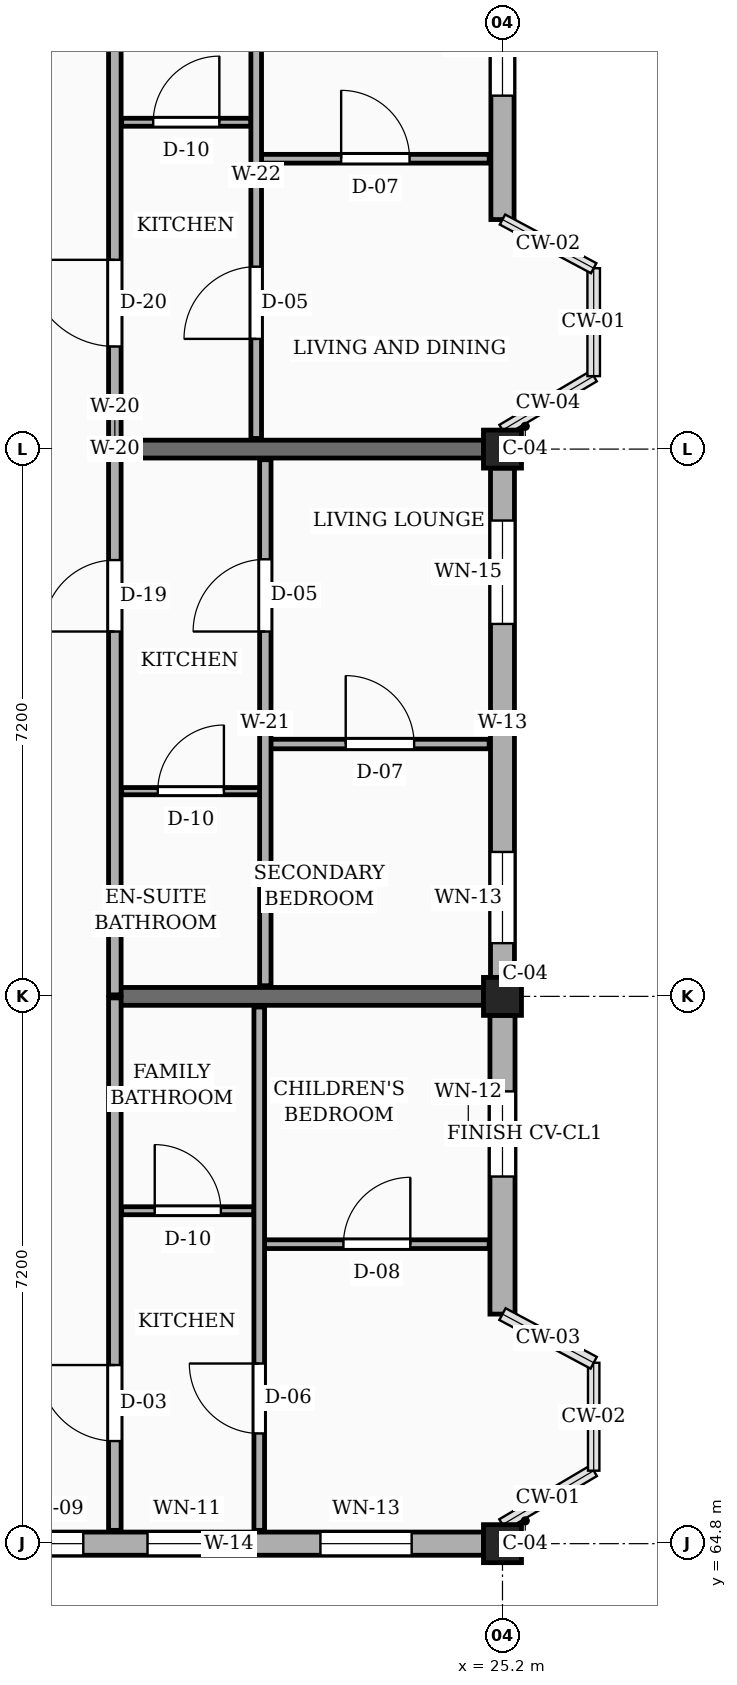
"""IFC4 building model, lengths in metres.
Left out: names, types, materials, properties, quantities, classifications, styles, units other than length and angle.
Written with IfcOpenShell. Run it as: python <this file> out.ifc"""

import sys

from ifc_helpers import new_model, si_unit, direction, frame, frame_2d, origin, origin_2d, place, context, subcontext, project, spatial, rectangle, extrude, element, fill, save


model = new_model("IFC4")
c1 = context("Model", 3, precision=1e-05, world=origin(), true_north=direction((0.0, 1.0)))
c2 = subcontext(c1, "Body", "Model", "MODEL_VIEW")
j1 = project(units=[si_unit("LENGTHUNIT", "METRE"), si_unit("PLANEANGLEUNIT", "RADIAN")], contexts=[c1])
p1 = place(None, origin())
s1 = spatial("IfcSite", under=j1, at=p1, CompositionType="ELEMENT")
p2 = place(p1, origin())
s2 = spatial("IfcBuilding", under=s1, at=p2, CompositionType="ELEMENT")
p3 = place(p2, frame((0.0, 0.0, 23.4)))
s3 = spatial("IfcBuildingStorey", under=s2, at=p3, CompositionType="ELEMENT", Elevation=23.4)
for number, where, z_axis, x_axis in (
    (1, (25.2, 64.8, 0.0), (0.0, 0.0, 1.0), (1.0, 0.0, 0.0)),
    (2, (25.2, 72.0, 0.0), (0.0, 0.0, 1.0), (1.0, 0.0, 0.0)),
    (3, (25.2, 79.2, 0.0), (0.0, 0.0, 1.0), (1.0, 0.0, 0.0)),
):
    element("IfcColumn", number, at=place(p3, frame(where, z_axis=z_axis, x_axis=x_axis)), inside=s3, PredefinedType="COLUMN", context=c2, shape_type="SweptSolid", body=[
        extrude(rectangle(XDim=0.5, YDim=0.5, at=origin_2d()), origin(), (0.0, 0.0, 1.0), 3.15),
    ])
for number, where, z_axis, x_axis in (
    (4, (20.1, 72.0, 0.0), (0.0, 0.0, 1.0), (1.0, 0.0, 0.0)),
    (5, (20.1, 79.2, 0.0), (0.0, 0.0, 1.0), (1.0, 0.0, 0.0)),
):
    element("IfcWall", number, at=place(p3, frame(where, z_axis=z_axis, x_axis=x_axis)), inside=s3, PredefinedType="SOLIDWALL", context=c2, shape_type="SweptSolid", body=[
        extrude(rectangle(XDim=4.85, YDim=0.235, at=frame_2d((2.425, 0.0))), origin(), (0.0, 0.0, 1.0), 2.21),
    ])
p4 = place(p3, frame((18.25, 64.8, 0.0), z_axis=(0.0, 0.0, 1.0), x_axis=(1.0, 0.0, 0.0)))
e6 = element("IfcWall", 6, at=p4, inside=s3, PredefinedType="SOLIDWALL", context=c2, shape_type="SweptSolid", body=[
    extrude(rectangle(XDim=6.7, YDim=0.305, at=frame_2d((3.35, 0.0))), origin(), (0.0, 0.0, 1.0), 2.48),
])
p5 = place(p4, frame((0.555, 0.0, 0.78)))
e7 = element("IfcOpeningElement", 7, at=p5, cuts=e6, PredefinedType="OPENING", context=c2, shape_type="SweptSolid", body=[
    extrude(rectangle(XDim=0.88, YDim=1.26, at=frame_2d((0.44, 0.63))), frame((0.0, 0.163, 0.0), z_axis=(0.0, -1.0, 0.0), x_axis=(1.0, 0.0, 0.0)), (0.0, 0.0, 1.0), 0.325),
])
p6 = place(p4, frame((2.28, 0.0, 0.78)))
e8 = element("IfcOpeningElement", 8, at=p6, cuts=e6, PredefinedType="OPENING", context=c2, shape_type="SweptSolid", body=[
    extrude(rectangle(XDim=1.04, YDim=1.26, at=frame_2d((0.52, 0.63))), frame((0.0, 0.163, 0.0), z_axis=(0.0, -1.0, 0.0), x_axis=(1.0, 0.0, 0.0)), (0.0, 0.0, 1.0), 0.325),
])
p7 = place(p4, frame((4.555, 0.0, 0.78)))
e9 = element("IfcOpeningElement", 9, at=p7, cuts=e6, PredefinedType="OPENING", context=c2, shape_type="SweptSolid", body=[
    extrude(rectangle(XDim=1.2, YDim=1.26, at=frame_2d((0.6, 0.63))), frame((0.0, 0.163, 0.0), z_axis=(0.0, -1.0, 0.0), x_axis=(1.0, 0.0, 0.0)), (0.0, 0.0, 1.0), 0.325),
])
p8 = place(p3, frame((25.2, 67.82, 0.0), z_axis=(0.0, 0.0, 1.0), x_axis=(0.0, 1.0, 0.0)))
e10 = element("IfcWall", 10, at=p8, inside=s3, PredefinedType="SOLIDWALL", context=c2, shape_type="SweptSolid", body=[
    extrude(rectangle(XDim=3.93, YDim=0.33, at=frame_2d((1.965, 0.0))), origin(), (0.0, 0.0, 1.0), 2.48),
])
p9 = place(p8, frame((1.81, 0.0, 0.78)))
e11 = element("IfcOpeningElement", 11, at=p9, cuts=e10, PredefinedType="OPENING", context=c2, shape_type="SweptSolid", body=[
    extrude(rectangle(XDim=1.12, YDim=1.26, at=frame_2d((0.56, 0.63))), frame((0.0, 0.175, 0.0), z_axis=(0.0, -1.0, 0.0), x_axis=(1.0, 0.0, 0.0)), (0.0, 0.0, 1.0), 0.35),
])
p10 = place(p3, frame((25.2, 72.25, 0.0), z_axis=(0.0, 0.0, 1.0), x_axis=(0.0, 1.0, 0.0)))
e12 = element("IfcWall", 12, at=p10, inside=s3, PredefinedType="SOLIDWALL", context=c2, shape_type="SweptSolid", body=[
    extrude(rectangle(XDim=6.7, YDim=0.315, at=frame_2d((3.35, 0.0))), origin(), (0.0, 0.0, 1.0), 2.48),
])
p11 = place(p10, frame((0.45, 0.0, 0.78)))
e13 = element("IfcOpeningElement", 13, at=p11, cuts=e12, PredefinedType="OPENING", context=c2, shape_type="SweptSolid", body=[
    extrude(rectangle(XDim=1.2, YDim=1.26, at=frame_2d((0.6, 0.63))), frame((0.0, 0.167, 0.0), z_axis=(0.0, -1.0, 0.0), x_axis=(1.0, 0.0, 0.0)), (0.0, 0.0, 1.0), 0.335),
])
p12 = place(p10, frame((4.65, 0.0, 0.78)))
e14 = element("IfcOpeningElement", 14, at=p12, cuts=e12, PredefinedType="OPENING", context=c2, shape_type="SweptSolid", body=[
    extrude(rectangle(XDim=1.36, YDim=1.26, at=frame_2d((0.68, 0.63))), frame((0.0, 0.167, 0.0), z_axis=(0.0, -1.0, 0.0), x_axis=(1.0, 0.0, 0.0)), (0.0, 0.0, 1.0), 0.335),
])
p13 = place(p3, frame((25.2, 82.22, 0.0), z_axis=(0.0, 0.0, 1.0), x_axis=(0.0, 1.0, 0.0)))
e15 = element("IfcWall", 15, at=p13, inside=s3, PredefinedType="SOLIDWALL", context=c2, shape_type="SweptSolid", body=[
    extrude(rectangle(XDim=3.93, YDim=0.305, at=frame_2d((1.965, 0.0))), origin(), (0.0, 0.0, 1.0), 2.48),
])
p14 = place(p13, frame((1.63, 0.0, 0.78)))
e16 = element("IfcOpeningElement", 16, at=p14, cuts=e15, PredefinedType="OPENING", context=c2, shape_type="SweptSolid", body=[
    extrude(rectangle(XDim=1.36, YDim=1.26, at=frame_2d((0.68, 0.63))), frame((0.0, 0.163, 0.0), z_axis=(0.0, -1.0, 0.0), x_axis=(1.0, 0.0, 0.0)), (0.0, 0.0, 1.0), 0.325),
])
p15 = place(p3, frame((20.1, 64.975, 0.0), z_axis=(0.0, 0.0, 1.0), x_axis=(0.0, 1.0, 0.0)))
e17 = element("IfcWall", 17, at=p15, inside=s3, PredefinedType="PARTITIONING", context=c2, shape_type="SweptSolid", body=[
    extrude(rectangle(XDim=7.005, YDim=0.165, at=frame_2d((3.502, 0.0))), origin(), (0.0, 0.0, 1.0), 2.345),
])
p16 = place(p15, frame((1.175, 0.0, 0.0)))
e18 = element("IfcOpeningElement", 18, at=p16, cuts=e17, PredefinedType="OPENING", context=c2, shape_type="SweptSolid", body=[
    extrude(rectangle(XDim=1.0, YDim=2.15, at=frame_2d((0.5, 1.075))), frame((0.0, 0.093, 0.0), z_axis=(0.0, -1.0, 0.0), x_axis=(1.0, 0.0, 0.0)), (0.0, 0.0, 1.0), 0.185),
])
p17 = place(p3, frame((20.1, 72.02, 0.0), z_axis=(0.0, 0.0, 1.0), x_axis=(0.0, 1.0, 0.0)))
e19 = element("IfcWall", 19, at=p17, inside=s3, PredefinedType="PARTITIONING", context=c2, shape_type="SweptSolid", body=[
    extrude(rectangle(XDim=7.16, YDim=0.165, at=frame_2d((3.58, 0.0))), origin(), (0.0, 0.0, 1.0), 2.345),
])
p18 = place(p17, frame((4.78, 0.0, 0.0)))
e20 = element("IfcOpeningElement", 20, at=p18, cuts=e19, PredefinedType="OPENING", context=c2, shape_type="SweptSolid", body=[
    extrude(rectangle(XDim=0.94, YDim=2.12, at=frame_2d((0.47, 1.06))), frame((0.0, 0.093, 0.0), z_axis=(0.0, -1.0, 0.0), x_axis=(1.0, 0.0, 0.0)), (0.0, 0.0, 1.0), 0.185),
])
p19 = place(p3, frame((20.1, 79.22, 0.0), z_axis=(0.0, 0.0, 1.0), x_axis=(0.0, 1.0, 0.0)))
e21 = element("IfcWall", 21, at=p19, inside=s3, PredefinedType="PARTITIONING", context=c2, shape_type="SweptSolid", body=[
    extrude(rectangle(XDim=7.16, YDim=0.165, at=frame_2d((3.58, 0.0))), origin(), (0.0, 0.0, 1.0), 2.345),
])
p20 = place(p19, frame((1.33, 0.0, 0.0)))
e22 = element("IfcOpeningElement", 22, at=p20, cuts=e21, PredefinedType="OPENING", context=c2, shape_type="SweptSolid", body=[
    extrude(rectangle(XDim=1.14, YDim=2.18, at=frame_2d((0.57, 1.09))), frame((0.0, 0.093, 0.0), z_axis=(0.0, -1.0, 0.0), x_axis=(1.0, 0.0, 0.0)), (0.0, 0.0, 1.0), 0.185),
])
p21 = place(p3, frame((22.07, 68.74, 0.0), z_axis=(0.0, 0.0, 1.0), x_axis=(1.0, 0.0, 0.0)))
e23 = element("IfcWall", 23, at=p21, inside=s3, PredefinedType="PARTITIONING", context=c2, shape_type="SweptSolid", body=[
    extrude(rectangle(XDim=2.955, YDim=0.115, at=frame_2d((1.478, 0.0))), origin(), (0.0, 0.0, 1.0), 2.345),
])
p22 = place(p21, frame((1.038, 0.0, 0.0)))
e24 = element("IfcOpeningElement", 24, at=p22, cuts=e23, PredefinedType="OPENING", context=c2, shape_type="SweptSolid", body=[
    extrude(rectangle(XDim=0.88, YDim=2.08, at=frame_2d((0.44, 1.04))), frame((0.0, 0.067, 0.0), z_axis=(0.0, -1.0, 0.0), x_axis=(1.0, 0.0, 0.0)), (0.0, 0.0, 1.0), 0.135),
])
p23 = place(p3, frame((20.19, 69.18, 0.0), z_axis=(0.0, 0.0, 1.0), x_axis=(1.0, 0.0, 0.0)))
e25 = element("IfcWall", 25, at=p23, inside=s3, PredefinedType="PARTITIONING", context=c2, shape_type="SweptSolid", body=[
    extrude(rectangle(XDim=1.74, YDim=0.105, at=frame_2d((0.87, 0.0))), origin(), (0.0, 0.0, 1.0), 2.345),
])
p24 = place(p23, frame((0.435, 0.0, 0.0)))
e26 = element("IfcOpeningElement", 26, at=p24, cuts=e25, PredefinedType="OPENING", context=c2, shape_type="SweptSolid", body=[
    extrude(rectangle(XDim=0.87, YDim=2.05, at=frame_2d((0.435, 1.025))), frame((0.0, 0.062, 0.0), z_axis=(0.0, -1.0, 0.0), x_axis=(1.0, 0.0, 0.0)), (0.0, 0.0, 1.0), 0.125),
])
p25 = place(p3, frame((22.0, 64.975, 0.0), z_axis=(0.0, 0.0, 1.0), x_axis=(0.0, 1.0, 0.0)))
e27 = element("IfcWall", 27, at=p25, inside=s3, PredefinedType="PARTITIONING", context=c2, shape_type="SweptSolid", body=[
    extrude(rectangle(XDim=6.885, YDim=0.14, at=frame_2d((3.442, 0.0))), origin(), (0.0, 0.0, 1.0), 2.345),
])
p26 = place(p25, frame((1.275, 0.0, 0.0)))
e28 = element("IfcOpeningElement", 28, at=p26, cuts=e27, PredefinedType="OPENING", context=c2, shape_type="SweptSolid", body=[
    extrude(rectangle(XDim=0.92, YDim=2.1, at=frame_2d((0.46, 1.05))), frame((0.0, 0.08, 0.0), z_axis=(0.0, -1.0, 0.0), x_axis=(1.0, 0.0, 0.0)), (0.0, 0.0, 1.0), 0.16),
])
p27 = place(p3, frame((22.15, 75.32, 0.0), z_axis=(0.0, 0.0, 1.0), x_axis=(1.0, 0.0, 0.0)))
e29 = element("IfcWall", 29, at=p27, inside=s3, PredefinedType="PARTITIONING", context=c2, shape_type="SweptSolid", body=[
    extrude(rectangle(XDim=2.875, YDim=0.125, at=frame_2d((1.438, 0.0))), origin(), (0.0, 0.0, 1.0), 2.345),
])
p28 = place(p27, frame((0.988, 0.0, 0.0)))
e30 = element("IfcOpeningElement", 30, at=p28, cuts=e29, PredefinedType="OPENING", context=c2, shape_type="SweptSolid", body=[
    extrude(rectangle(XDim=0.9, YDim=2.1, at=frame_2d((0.45, 1.05))), frame((0.0, 0.073, 0.0), z_axis=(0.0, -1.0, 0.0), x_axis=(1.0, 0.0, 0.0)), (0.0, 0.0, 1.0), 0.145),
])
p29 = place(p3, frame((20.19, 74.7, 0.0), z_axis=(0.0, 0.0, 1.0), x_axis=(1.0, 0.0, 0.0)))
e31 = element("IfcWall", 31, at=p29, inside=s3, PredefinedType="PARTITIONING", context=c2, shape_type="SweptSolid", body=[
    extrude(rectangle(XDim=1.82, YDim=0.095, at=frame_2d((0.91, 0.0))), origin(), (0.0, 0.0, 1.0), 2.345),
])
p30 = place(p29, frame((0.475, 0.0, 0.0)))
e32 = element("IfcOpeningElement", 32, at=p30, cuts=e31, PredefinedType="OPENING", context=c2, shape_type="SweptSolid", body=[
    extrude(rectangle(XDim=0.87, YDim=2.05, at=frame_2d((0.435, 1.025))), frame((0.0, 0.058, 0.0), z_axis=(0.0, -1.0, 0.0), x_axis=(1.0, 0.0, 0.0)), (0.0, 0.0, 1.0), 0.115),
])
p31 = place(p3, frame((22.08, 72.14, 0.0), z_axis=(0.0, 0.0, 1.0), x_axis=(0.0, 1.0, 0.0)))
e33 = element("IfcWall", 33, at=p31, inside=s3, PredefinedType="PARTITIONING", context=c2, shape_type="SweptSolid", body=[
    extrude(rectangle(XDim=6.92, YDim=0.15, at=frame_2d((3.46, 0.0))), origin(), (0.0, 0.0, 1.0), 2.345),
])
p32 = place(p31, frame((4.66, 0.0, 0.0)))
e34 = element("IfcOpeningElement", 34, at=p32, cuts=e33, PredefinedType="OPENING", context=c2, shape_type="SweptSolid", body=[
    extrude(rectangle(XDim=0.95, YDim=2.1, at=frame_2d((0.475, 1.05))), frame((0.0, 0.085, 0.0), z_axis=(0.0, -1.0, 0.0), x_axis=(1.0, 0.0, 0.0)), (0.0, 0.0, 1.0), 0.17),
])
p33 = place(p3, frame((22.03, 83.02, 0.0), z_axis=(0.0, 0.0, 1.0), x_axis=(1.0, 0.0, 0.0)))
e35 = element("IfcWall", 35, at=p33, inside=s3, PredefinedType="PARTITIONING", context=c2, shape_type="SweptSolid", body=[
    extrude(rectangle(XDim=2.995, YDim=0.115, at=frame_2d((1.498, 0.0))), origin(), (0.0, 0.0, 1.0), 2.345),
])
p34 = place(p33, frame((1.048, 0.0, 0.0)))
e36 = element("IfcOpeningElement", 36, at=p34, cuts=e35, PredefinedType="OPENING", context=c2, shape_type="SweptSolid", body=[
    extrude(rectangle(XDim=0.9, YDim=2.1, at=frame_2d((0.45, 1.05))), frame((0.0, 0.067, 0.0), z_axis=(0.0, -1.0, 0.0), x_axis=(1.0, 0.0, 0.0)), (0.0, 0.0, 1.0), 0.135),
])
p35 = place(p3, frame((20.19, 83.5, 0.0), z_axis=(0.0, 0.0, 1.0), x_axis=(1.0, 0.0, 0.0)))
e37 = element("IfcWall", 37, at=p35, inside=s3, PredefinedType="PARTITIONING", context=c2, shape_type="SweptSolid", body=[
    extrude(rectangle(XDim=1.7, YDim=0.105, at=frame_2d((0.85, 0.0))), origin(), (0.0, 0.0, 1.0), 2.345),
])
p36 = place(p35, frame((0.415, 0.0, 0.0)))
e38 = element("IfcOpeningElement", 38, at=p36, cuts=e37, PredefinedType="OPENING", context=c2, shape_type="SweptSolid", body=[
    extrude(rectangle(XDim=0.87, YDim=2.05, at=frame_2d((0.435, 1.025))), frame((0.0, 0.062, 0.0), z_axis=(0.0, -1.0, 0.0), x_axis=(1.0, 0.0, 0.0)), (0.0, 0.0, 1.0), 0.125),
])
p37 = place(p3, frame((21.96, 79.34, 0.0), z_axis=(0.0, 0.0, 1.0), x_axis=(0.0, 1.0, 0.0)))
e39 = element("IfcWall", 39, at=p37, inside=s3, PredefinedType="PARTITIONING", context=c2, shape_type="SweptSolid", body=[
    extrude(rectangle(XDim=6.92, YDim=0.14, at=frame_2d((3.46, 0.0))), origin(), (0.0, 0.0, 1.0), 2.345),
])
p38 = place(p37, frame((1.31, 0.0, 0.0)))
e40 = element("IfcOpeningElement", 40, at=p38, cuts=e39, PredefinedType="OPENING", context=c2, shape_type="SweptSolid", body=[
    extrude(rectangle(XDim=0.95, YDim=2.1, at=frame_2d((0.475, 1.05))), frame((0.0, 0.08, 0.0), z_axis=(0.0, -1.0, 0.0), x_axis=(1.0, 0.0, 0.0)), (0.0, 0.0, 1.0), 0.16),
])
p39 = place(p5, origin())
e41 = element("IfcWindow", 41, at=p39, inside=s3, PartitioningType="SINGLE_PANEL", PredefinedType="WINDOW", context=c2, shape_type="SweptSolid", body=[
    extrude(rectangle(XDim=0.88, YDim=1.26, at=frame_2d((0.44, 0.63))), frame((0.0, 0.03, 0.0), z_axis=(0.0, -1.0, 0.0), x_axis=(1.0, 0.0, 0.0)), (0.0, 0.0, 1.0), 0.06),
])
fill(e7, e41)
p40 = place(p6, origin())
e42 = element("IfcWindow", 42, at=p40, inside=s3, PartitioningType="SINGLE_PANEL", PredefinedType="WINDOW", context=c2, shape_type="SweptSolid", body=[
    extrude(rectangle(XDim=1.04, YDim=1.26, at=frame_2d((0.52, 0.63))), frame((0.0, 0.03, 0.0), z_axis=(0.0, -1.0, 0.0), x_axis=(1.0, 0.0, 0.0)), (0.0, 0.0, 1.0), 0.06),
])
fill(e8, e42)
p41 = place(p7, origin())
e43 = element("IfcWindow", 43, at=p41, inside=s3, PartitioningType="SINGLE_PANEL", PredefinedType="WINDOW", context=c2, shape_type="SweptSolid", body=[
    extrude(rectangle(XDim=1.2, YDim=1.26, at=frame_2d((0.6, 0.63))), frame((0.0, 0.03, 0.0), z_axis=(0.0, -1.0, 0.0), x_axis=(1.0, 0.0, 0.0)), (0.0, 0.0, 1.0), 0.06),
])
fill(e9, e43)
p42 = place(p9, origin())
e44 = element("IfcWindow", 44, at=p42, inside=s3, PartitioningType="SINGLE_PANEL", PredefinedType="WINDOW", context=c2, shape_type="SweptSolid", body=[
    extrude(rectangle(XDim=1.12, YDim=1.26, at=frame_2d((0.56, 0.63))), frame((0.0, 0.03, 0.0), z_axis=(0.0, -1.0, 0.0), x_axis=(1.0, 0.0, 0.0)), (0.0, 0.0, 1.0), 0.06),
])
fill(e11, e44)
p43 = place(p11, origin())
e45 = element("IfcWindow", 45, at=p43, inside=s3, PartitioningType="SINGLE_PANEL", PredefinedType="WINDOW", context=c2, shape_type="SweptSolid", body=[
    extrude(rectangle(XDim=1.2, YDim=1.26, at=frame_2d((0.6, 0.63))), frame((0.0, 0.03, 0.0), z_axis=(0.0, -1.0, 0.0), x_axis=(1.0, 0.0, 0.0)), (0.0, 0.0, 1.0), 0.06),
])
fill(e13, e45)
p44 = place(p12, origin())
e46 = element("IfcWindow", 46, at=p44, inside=s3, PartitioningType="SINGLE_PANEL", PredefinedType="WINDOW", context=c2, shape_type="SweptSolid", body=[
    extrude(rectangle(XDim=1.36, YDim=1.26, at=frame_2d((0.68, 0.63))), frame((0.0, 0.03, 0.0), z_axis=(0.0, -1.0, 0.0), x_axis=(1.0, 0.0, 0.0)), (0.0, 0.0, 1.0), 0.06),
])
fill(e14, e46)
p45 = place(p14, origin())
e47 = element("IfcWindow", 47, at=p45, inside=s3, PartitioningType="SINGLE_PANEL", PredefinedType="WINDOW", context=c2, shape_type="SweptSolid", body=[
    extrude(rectangle(XDim=1.36, YDim=1.26, at=frame_2d((0.68, 0.63))), frame((0.0, 0.03, 0.0), z_axis=(0.0, -1.0, 0.0), x_axis=(1.0, 0.0, 0.0)), (0.0, 0.0, 1.0), 0.06),
])
fill(e16, e47)
p46 = place(p16, origin())
e48 = element("IfcDoor", 48, at=p46, inside=s3, OperationType="SINGLE_SWING_RIGHT", PredefinedType="DOOR", context=c2, shape_type="SweptSolid", body=[
    extrude(rectangle(XDim=1.0, YDim=2.15, at=frame_2d((0.5, 1.075))), frame((0.0, 0.025, 0.0), z_axis=(0.0, -1.0, 0.0), x_axis=(1.0, 0.0, 0.0)), (0.0, 0.0, 1.0), 0.05),
])
fill(e18, e48)
p47 = place(p18, origin())
e49 = element("IfcDoor", 49, at=p47, inside=s3, OperationType="SINGLE_SWING_LEFT", PredefinedType="DOOR", context=c2, shape_type="SweptSolid", body=[
    extrude(rectangle(XDim=0.94, YDim=2.12, at=frame_2d((0.47, 1.06))), frame((0.0, 0.025, 0.0), z_axis=(0.0, -1.0, 0.0), x_axis=(1.0, 0.0, 0.0)), (0.0, 0.0, 1.0), 0.05),
])
fill(e20, e49)
p48 = place(p20, origin())
e50 = element("IfcDoor", 50, at=p48, inside=s3, OperationType="SINGLE_SWING_RIGHT", PredefinedType="DOOR", context=c2, shape_type="SweptSolid", body=[
    extrude(rectangle(XDim=1.14, YDim=2.18, at=frame_2d((0.57, 1.09))), frame((0.0, 0.025, 0.0), z_axis=(0.0, -1.0, 0.0), x_axis=(1.0, 0.0, 0.0)), (0.0, 0.0, 1.0), 0.05),
])
fill(e22, e50)
p49 = place(p22, origin())
e51 = element("IfcDoor", 51, at=p49, inside=s3, OperationType="SINGLE_SWING_RIGHT", PredefinedType="DOOR", context=c2, shape_type="SweptSolid", body=[
    extrude(rectangle(XDim=0.88, YDim=2.08, at=frame_2d((0.44, 1.04))), frame((0.0, 0.025, 0.0), z_axis=(0.0, -1.0, 0.0), x_axis=(1.0, 0.0, 0.0)), (0.0, 0.0, 1.0), 0.05),
])
fill(e24, e51)
p50 = place(p24, origin())
e52 = element("IfcDoor", 52, at=p50, inside=s3, OperationType="SINGLE_SWING_LEFT", PredefinedType="DOOR", context=c2, shape_type="SweptSolid", body=[
    extrude(rectangle(XDim=0.87, YDim=2.05, at=frame_2d((0.435, 1.025))), frame((0.0, 0.025, 0.0), z_axis=(0.0, -1.0, 0.0), x_axis=(1.0, 0.0, 0.0)), (0.0, 0.0, 1.0), 0.05),
])
fill(e26, e52)
p51 = place(p26, origin())
e53 = element("IfcDoor", 53, at=p51, inside=s3, OperationType="SINGLE_SWING_RIGHT", PredefinedType="DOOR", context=c2, shape_type="SweptSolid", body=[
    extrude(rectangle(XDim=0.92, YDim=2.1, at=frame_2d((0.46, 1.05))), frame((0.0, 0.025, 0.0), z_axis=(0.0, -1.0, 0.0), x_axis=(1.0, 0.0, 0.0)), (0.0, 0.0, 1.0), 0.05),
])
fill(e28, e53)
p52 = place(p28, origin())
e54 = element("IfcDoor", 54, at=p52, inside=s3, OperationType="SINGLE_SWING_LEFT", PredefinedType="DOOR", context=c2, shape_type="SweptSolid", body=[
    extrude(rectangle(XDim=0.9, YDim=2.1, at=frame_2d((0.45, 1.05))), frame((0.0, 0.025, 0.0), z_axis=(0.0, -1.0, 0.0), x_axis=(1.0, 0.0, 0.0)), (0.0, 0.0, 1.0), 0.05),
])
fill(e30, e54)
p53 = place(p30, origin())
e55 = element("IfcDoor", 55, at=p53, inside=s3, OperationType="SINGLE_SWING_RIGHT", PredefinedType="DOOR", context=c2, shape_type="SweptSolid", body=[
    extrude(rectangle(XDim=0.87, YDim=2.05, at=frame_2d((0.435, 1.025))), frame((0.0, 0.025, 0.0), z_axis=(0.0, -1.0, 0.0), x_axis=(1.0, 0.0, 0.0)), (0.0, 0.0, 1.0), 0.05),
])
fill(e32, e55)
p54 = place(p32, origin())
e56 = element("IfcDoor", 56, at=p54, inside=s3, OperationType="SINGLE_SWING_LEFT", PredefinedType="DOOR", context=c2, shape_type="SweptSolid", body=[
    extrude(rectangle(XDim=0.95, YDim=2.1, at=frame_2d((0.475, 1.05))), frame((0.0, 0.025, 0.0), z_axis=(0.0, -1.0, 0.0), x_axis=(1.0, 0.0, 0.0)), (0.0, 0.0, 1.0), 0.05),
])
fill(e34, e56)
p55 = place(p34, origin())
e57 = element("IfcDoor", 57, at=p55, inside=s3, OperationType="SINGLE_SWING_LEFT", PredefinedType="DOOR", context=c2, shape_type="SweptSolid", body=[
    extrude(rectangle(XDim=0.9, YDim=2.1, at=frame_2d((0.45, 1.05))), frame((0.0, 0.025, 0.0), z_axis=(0.0, -1.0, 0.0), x_axis=(1.0, 0.0, 0.0)), (0.0, 0.0, 1.0), 0.05),
])
fill(e36, e57)
p56 = place(p36, origin())
e58 = element("IfcDoor", 58, at=p56, inside=s3, OperationType="SINGLE_SWING_RIGHT", PredefinedType="DOOR", context=c2, shape_type="SweptSolid", body=[
    extrude(rectangle(XDim=0.87, YDim=2.05, at=frame_2d((0.435, 1.025))), frame((0.0, 0.025, 0.0), z_axis=(0.0, -1.0, 0.0), x_axis=(1.0, 0.0, 0.0)), (0.0, 0.0, 1.0), 0.05),
])
fill(e38, e58)
p57 = place(p38, origin())
e59 = element("IfcDoor", 59, at=p57, inside=s3, OperationType="SINGLE_SWING_LEFT", PredefinedType="DOOR", context=c2, shape_type="SweptSolid", body=[
    extrude(rectangle(XDim=0.95, YDim=2.1, at=frame_2d((0.475, 1.05))), frame((0.0, 0.025, 0.0), z_axis=(0.0, -1.0, 0.0), x_axis=(1.0, 0.0, 0.0)), (0.0, 0.0, 1.0), 0.05),
])
fill(e40, e59)
save(model, sys.argv[1])
